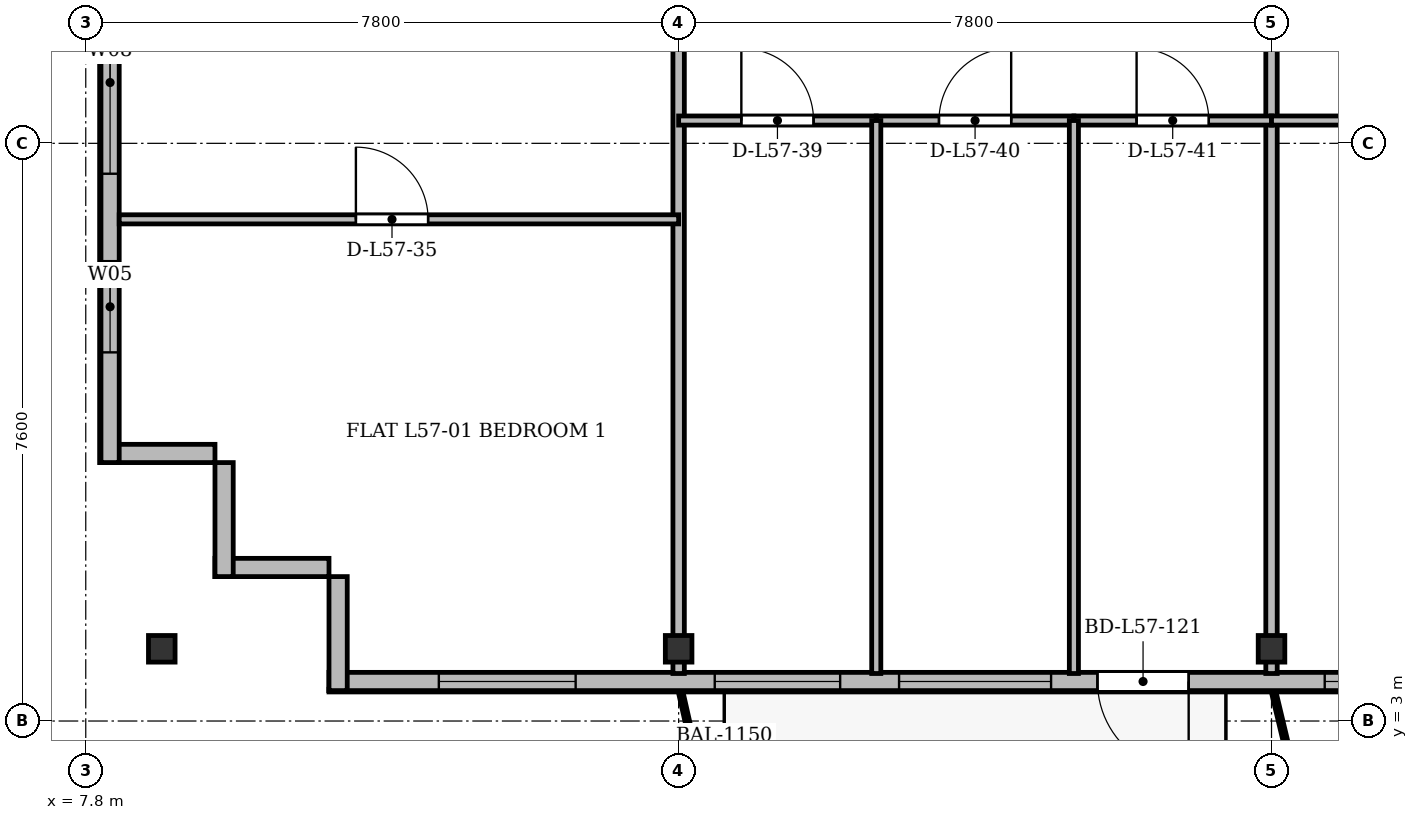
"""IFC4 building model, lengths in metres.
Left out: names, types, materials, properties, quantities, classifications, styles, units other than length and angle.
Written with IfcOpenShell. Run it as: python <this file> out.ifc"""

import sys

from ifc_helpers import new_model, si_unit, direction, frame, frame_2d, origin, origin_2d, place, context, subcontext, project, spatial, rectangle, i_section, extrude, source, transform, mapped, element, fill, save


model = new_model("IFC4")
c1 = context("Model", 3, precision=1e-05, world=origin(), true_north=direction((0.0, 1.0)))
c2 = subcontext(c1, "Body", "Model", "MODEL_VIEW")
j1 = project(units=[si_unit("LENGTHUNIT", "METRE"), si_unit("PLANEANGLEUNIT", "RADIAN")], contexts=[c1])
p1 = place(None, origin())
s1 = spatial("IfcSite", under=j1, at=p1, CompositionType="ELEMENT")
p2 = place(p1, origin())
s2 = spatial("IfcBuilding", under=s1, at=p2, CompositionType="ELEMENT")
p3 = place(p2, frame((0.0, 0.0, 219.3)))
s3 = spatial("IfcBuildingStorey", under=s2, at=p3, CompositionType="ELEMENT", Elevation=219.3)
m1 = source(origin(), c2, "Body", "SweptSolid", [
    extrude(i_section(OverallWidth=0.35, OverallDepth=0.35, WebThickness=0.018, FlangeThickness=0.028, at=origin_2d()), origin(), (0.0, 0.0, 1.0), 3.6),
])
for number, where, z_axis, x_axis in (
    (1, (8.8, 3.95, 0.0), (0.0, 0.0, 1.0), (1.0, 0.0, 0.0)),
    (2, (15.6, 3.95, 0.0), (0.0, 0.0, 1.0), (1.0, 0.0, 0.0)),
    (3, (23.4, 3.95, 0.0), (0.0, 0.0, 1.0), (1.0, 0.0, 0.0)),
):
    element("IfcColumn", number, at=place(p3, frame(where, z_axis=z_axis, x_axis=x_axis)), inside=s3, PredefinedType="COLUMN", context=c2, shape_type="MappedRepresentation", body=[
        mapped(m1, transform((0.0, 0.0, 0.0), x_axis=(1.0, 0.0, 0.0), y_axis=(0.0, 1.0, 0.0), z_axis=(0.0, 0.0, 1.0), scale=1.0)),
    ])
for number, where, z_axis, x_axis in (
    (4, (11.0, 5.02, 0.0), (0.0, 0.0, 1.0), (-1.0, 0.0, 0.0)),
    (5, (9.62, 4.9, 0.0), (0.0, 0.0, 1.0), (0.0, 1.0, 0.0)),
):
    element("IfcWall", number, at=place(p3, frame(where, z_axis=z_axis, x_axis=x_axis)), inside=s3, PredefinedType="SOLIDWALL", context=c2, shape_type="SweptSolid", body=[
        extrude(rectangle(XDim=1.5, YDim=0.24, at=frame_2d((0.75, 0.0))), origin(), (0.0, 0.0, 1.0), 3.36),
    ])
p4 = place(p3, frame((9.5, 6.52, 0.0), z_axis=(0.0, 0.0, 1.0), x_axis=(-1.0, 0.0, 0.0)))
e6 = element("IfcWall", 6, at=p4, inside=s3, PredefinedType="SOLIDWALL", context=c2, shape_type="SweptSolid", body=[
    extrude(rectangle(XDim=1.5, YDim=0.24, at=frame_2d((0.75, 0.0))), origin(), (0.0, 0.0, 1.0), 2.86),
])
p5 = place(p3, frame((8.12, 6.4, 0.0), z_axis=(0.0, 0.0, 1.0), x_axis=(0.0, 1.0, 0.0)))
e7 = element("IfcWall", 7, at=p5, inside=s3, PredefinedType="SOLIDWALL", context=c2, shape_type="SweptSolid", body=[
    extrude(rectangle(XDim=39.1, YDim=0.24, at=frame_2d((19.55, 0.0))), origin(), (0.0, 0.0, 1.0), 3.36),
])
p6 = place(p5, frame((1.45, 0.0, 0.92)))
e8 = element("IfcOpeningElement", 8, at=p6, cuts=e7, PredefinedType="OPENING", context=c2, shape_type="SweptSolid", body=[
    extrude(rectangle(XDim=1.2, YDim=1.65, at=frame_2d((0.6, 0.825))), frame((0.0, 0.13, 0.0), z_axis=(0.0, -1.0, 0.0), x_axis=(1.0, 0.0, 0.0)), (0.0, 0.0, 1.0), 0.26),
])
p7 = place(p5, frame((3.8, 0.0, 0.92)))
e9 = element("IfcOpeningElement", 9, at=p7, cuts=e7, PredefinedType="OPENING", context=c2, shape_type="SweptSolid", body=[
    extrude(rectangle(XDim=2.4, YDim=2.1, at=frame_2d((1.2, 1.05))), frame((0.0, 0.13, 0.0), z_axis=(0.0, -1.0, 0.0), x_axis=(1.0, 0.0, 0.0)), (0.0, 0.0, 1.0), 0.26),
])
p8 = place(p5, frame((8.0, 0.0, 0.92)))
e10 = element("IfcOpeningElement", 10, at=p8, cuts=e7, PredefinedType="OPENING", context=c2, shape_type="SweptSolid", body=[
    extrude(rectangle(XDim=2.4, YDim=2.1, at=frame_2d((1.2, 1.05))), frame((0.0, 0.13, 0.0), z_axis=(0.0, -1.0, 0.0), x_axis=(1.0, 0.0, 0.0)), (0.0, 0.0, 1.0), 0.26),
])
p9 = place(p5, frame((15.2, 0.0, 0.92)))
e11 = element("IfcOpeningElement", 11, at=p9, cuts=e7, PredefinedType="OPENING", context=c2, shape_type="SweptSolid", body=[
    extrude(rectangle(XDim=2.4, YDim=2.1, at=frame_2d((1.2, 1.05))), frame((0.0, 0.13, 0.0), z_axis=(0.0, -1.0, 0.0), x_axis=(1.0, 0.0, 0.0)), (0.0, 0.0, 1.0), 0.26),
])
p10 = place(p5, frame((33.4, 0.0, 0.92)))
e12 = element("IfcOpeningElement", 12, at=p10, cuts=e7, PredefinedType="OPENING", context=c2, shape_type="SweptSolid", body=[
    extrude(rectangle(XDim=1.2, YDim=1.65, at=frame_2d((0.6, 0.825))), frame((0.0, 0.13, 0.0), z_axis=(0.0, -1.0, 0.0), x_axis=(1.0, 0.0, 0.0)), (0.0, 0.0, 1.0), 0.26),
])
p11 = place(p5, frame((36.75, 0.0, 0.92)))
e13 = element("IfcOpeningElement", 13, at=p11, cuts=e7, PredefinedType="OPENING", context=c2, shape_type="SweptSolid", body=[
    extrude(rectangle(XDim=1.2, YDim=1.65, at=frame_2d((0.6, 0.825))), frame((0.0, 0.13, 0.0), z_axis=(0.0, -1.0, 0.0), x_axis=(1.0, 0.0, 0.0)), (0.0, 0.0, 1.0), 0.26),
])
p12 = place(p3, frame((63.4, 3.52, 0.0), z_axis=(0.0, 0.0, 1.0), x_axis=(-1.0, 0.0, 0.0)))
e14 = element("IfcWall", 14, at=p12, inside=s3, PredefinedType="SOLIDWALL", context=c2, shape_type="SweptSolid", body=[
    extrude(rectangle(XDim=52.4, YDim=0.24, at=frame_2d((26.2, 0.0))), origin(), (0.0, 0.0, 1.0), 3.36),
])
p13 = place(p12, frame((1.595, 0.0, 0.9)))
e15 = element("IfcOpeningElement", 15, at=p13, cuts=e14, PredefinedType="OPENING", context=c2, shape_type="SweptSolid", body=[
    extrude(rectangle(XDim=1.5, YDim=1.75, at=frame_2d((0.75, 0.875))), frame((0.0, 0.13, 0.0), z_axis=(0.0, -1.0, 0.0), x_axis=(1.0, 0.0, 0.0)), (0.0, 0.0, 1.0), 0.26),
])
p14 = place(p12, frame((7.5, 0.0, 0.9)))
e16 = element("IfcOpeningElement", 16, at=p14, cuts=e14, PredefinedType="OPENING", context=c2, shape_type="SweptSolid", body=[
    extrude(rectangle(XDim=2.0, YDim=1.95, at=frame_2d((1.0, 0.975))), frame((0.0, 0.13, 0.0), z_axis=(0.0, -1.0, 0.0), x_axis=(1.0, 0.0, 0.0)), (0.0, 0.0, 1.0), 0.26),
])
p15 = place(p12, frame((13.42, 0.0, 0.0)))
e17 = element("IfcOpeningElement", 17, at=p15, cuts=e14, PredefinedType="OPENING", context=c2, shape_type="SweptSolid", body=[
    extrude(rectangle(XDim=1.2, YDim=2.2, at=frame_2d((0.6, 1.1))), frame((0.0, 0.13, 0.0), z_axis=(0.0, -1.0, 0.0), x_axis=(1.0, 0.0, 0.0)), (0.0, 0.0, 1.0), 0.26),
])
p16 = place(p12, frame((15.1, 0.0, 0.9)))
e18 = element("IfcOpeningElement", 18, at=p16, cuts=e14, PredefinedType="OPENING", context=c2, shape_type="SweptSolid", body=[
    extrude(rectangle(XDim=1.8, YDim=1.8, at=frame_2d((0.9, 0.9))), frame((0.0, 0.13, 0.0), z_axis=(0.0, -1.0, 0.0), x_axis=(1.0, 0.0, 0.0)), (0.0, 0.0, 1.0), 0.26),
])
p17 = place(p12, frame((17.65, 0.0, 0.9)))
e19 = element("IfcOpeningElement", 19, at=p17, cuts=e14, PredefinedType="OPENING", context=c2, shape_type="SweptSolid", body=[
    extrude(rectangle(XDim=1.5, YDim=1.75, at=frame_2d((0.75, 0.875))), frame((0.0, 0.13, 0.0), z_axis=(0.0, -1.0, 0.0), x_axis=(1.0, 0.0, 0.0)), (0.0, 0.0, 1.0), 0.26),
])
p18 = place(p12, frame((20.5, 0.0, 0.9)))
e20 = element("IfcOpeningElement", 20, at=p18, cuts=e14, PredefinedType="OPENING", context=c2, shape_type="SweptSolid", body=[
    extrude(rectangle(XDim=1.5, YDim=1.75, at=frame_2d((0.75, 0.875))), frame((0.0, 0.13, 0.0), z_axis=(0.0, -1.0, 0.0), x_axis=(1.0, 0.0, 0.0)), (0.0, 0.0, 1.0), 0.26),
])
p19 = place(p12, frame((23.55, 0.0, 0.9)))
e21 = element("IfcOpeningElement", 21, at=p19, cuts=e14, PredefinedType="OPENING", context=c2, shape_type="SweptSolid", body=[
    extrude(rectangle(XDim=2.0, YDim=1.95, at=frame_2d((1.0, 0.975))), frame((0.0, 0.13, 0.0), z_axis=(0.0, -1.0, 0.0), x_axis=(1.0, 0.0, 0.0)), (0.0, 0.0, 1.0), 0.26),
])
p20 = place(p12, frame((28.675, 0.0, 0.9)))
e22 = element("IfcOpeningElement", 22, at=p20, cuts=e14, PredefinedType="OPENING", context=c2, shape_type="SweptSolid", body=[
    extrude(rectangle(XDim=1.65, YDim=1.85, at=frame_2d((0.825, 0.925))), frame((0.0, 0.13, 0.0), z_axis=(0.0, -1.0, 0.0), x_axis=(1.0, 0.0, 0.0)), (0.0, 0.0, 1.0), 0.26),
])
p21 = place(p12, frame((33.7, 0.0, 0.9)))
e23 = element("IfcOpeningElement", 23, at=p21, cuts=e14, PredefinedType="OPENING", context=c2, shape_type="SweptSolid", body=[
    extrude(rectangle(XDim=1.8, YDim=1.8, at=frame_2d((0.9, 0.9))), frame((0.0, 0.13, 0.0), z_axis=(0.0, -1.0, 0.0), x_axis=(1.0, 0.0, 0.0)), (0.0, 0.0, 1.0), 0.26),
])
p22 = place(p12, frame((37.1, 0.0, 0.9)))
e24 = element("IfcOpeningElement", 24, at=p22, cuts=e14, PredefinedType="OPENING", context=c2, shape_type="SweptSolid", body=[
    extrude(rectangle(XDim=2.2, YDim=1.8, at=frame_2d((1.1, 0.9))), frame((0.0, 0.13, 0.0), z_axis=(0.0, -1.0, 0.0), x_axis=(1.0, 0.0, 0.0)), (0.0, 0.0, 1.0), 0.26),
])
p23 = place(p12, frame((41.09, 0.0, 0.0)))
e25 = element("IfcOpeningElement", 25, at=p23, cuts=e14, PredefinedType="OPENING", context=c2, shape_type="SweptSolid", body=[
    extrude(rectangle(XDim=1.2, YDim=2.2, at=frame_2d((0.6, 1.1))), frame((0.0, 0.13, 0.0), z_axis=(0.0, -1.0, 0.0), x_axis=(1.0, 0.0, 0.0)), (0.0, 0.0, 1.0), 0.26),
])
p24 = place(p12, frame((42.9, 0.0, 0.9)))
e26 = element("IfcOpeningElement", 26, at=p24, cuts=e14, PredefinedType="OPENING", context=c2, shape_type="SweptSolid", body=[
    extrude(rectangle(XDim=2.0, YDim=1.95, at=frame_2d((1.0, 0.975))), frame((0.0, 0.13, 0.0), z_axis=(0.0, -1.0, 0.0), x_axis=(1.0, 0.0, 0.0)), (0.0, 0.0, 1.0), 0.26),
])
p25 = place(p12, frame((45.675, 0.0, 0.9)))
e27 = element("IfcOpeningElement", 27, at=p25, cuts=e14, PredefinedType="OPENING", context=c2, shape_type="SweptSolid", body=[
    extrude(rectangle(XDim=1.65, YDim=1.85, at=frame_2d((0.825, 0.925))), frame((0.0, 0.13, 0.0), z_axis=(0.0, -1.0, 0.0), x_axis=(1.0, 0.0, 0.0)), (0.0, 0.0, 1.0), 0.26),
])
p26 = place(p12, frame((49.155, 0.0, 0.9)))
e28 = element("IfcOpeningElement", 28, at=p26, cuts=e14, PredefinedType="OPENING", context=c2, shape_type="SweptSolid", body=[
    extrude(rectangle(XDim=1.8, YDim=1.8, at=frame_2d((0.9, 0.9))), frame((0.0, 0.13, 0.0), z_axis=(0.0, -1.0, 0.0), x_axis=(1.0, 0.0, 0.0)), (0.0, 0.0, 1.0), 0.26),
])
p27 = place(p3, frame((11.12, 3.4, 0.0), z_axis=(0.0, 0.0, 1.0), x_axis=(0.0, 1.0, 0.0)))
e29 = element("IfcWall", 29, at=p27, inside=s3, PredefinedType="SOLIDWALL", context=c2, shape_type="SweptSolid", body=[
    extrude(rectangle(XDim=1.5, YDim=0.24, at=frame_2d((0.75, 0.0))), origin(), (0.0, 0.0, 1.0), 2.91),
])
for number, where, z_axis, x_axis in (
    (30, (15.6, 3.625, 0.0), (0.0, 0.0, 1.0), (0.0, 1.0, 0.0)),
    (31, (23.4, 3.625, 0.0), (0.0, 0.0, 1.0), (0.0, 1.0, 0.0)),
):
    element("IfcWall", number, at=place(p3, frame(where, z_axis=z_axis, x_axis=x_axis)), inside=s3, PredefinedType="PARTITIONING", context=c2, shape_type="SweptSolid", body=[
        extrude(rectangle(XDim=27.375, YDim=0.15, at=frame_2d((13.688, 0.0))), origin(), (0.0, 0.0, 1.0), 2.86),
    ])
p28 = place(p3, frame((8.24, 9.6, 0.0), z_axis=(0.0, 0.0, 1.0), x_axis=(1.0, 0.0, 0.0)))
e32 = element("IfcWall", 32, at=p28, inside=s3, PredefinedType="PARTITIONING", context=c2, shape_type="SweptSolid", body=[
    extrude(rectangle(XDim=7.36, YDim=0.12, at=frame_2d((3.68, 0.0))), origin(), (0.0, 0.0, 1.0), 2.86),
])
p29 = place(p28, frame((3.114, 0.0, 0.0)))
e33 = element("IfcOpeningElement", 33, at=p29, cuts=e32, PredefinedType="OPENING", context=c2, shape_type="SweptSolid", body=[
    extrude(rectangle(XDim=0.95, YDim=2.15, at=frame_2d((0.475, 1.075))), frame((0.0, 0.07, 0.0), z_axis=(0.0, -1.0, 0.0), x_axis=(1.0, 0.0, 0.0)), (0.0, 0.0, 1.0), 0.14),
])
p30 = place(p3, frame((15.6, 10.9, 0.0), z_axis=(0.0, 0.0, 1.0), x_axis=(1.0, 0.0, 0.0)))
e34 = element("IfcWall", 34, at=p30, inside=s3, PredefinedType="PARTITIONING", context=c2, shape_type="SweptSolid", body=[
    extrude(rectangle(XDim=2.6, YDim=0.12, at=frame_2d((1.3, 0.0))), origin(), (0.0, 0.0, 1.0), 2.86),
])
p31 = place(p30, frame((0.825, 0.0, 0.0)))
e35 = element("IfcOpeningElement", 35, at=p31, cuts=e34, PredefinedType="OPENING", context=c2, shape_type="SweptSolid", body=[
    extrude(rectangle(XDim=0.95, YDim=2.15, at=frame_2d((0.475, 1.075))), frame((0.0, 0.07, 0.0), z_axis=(0.0, -1.0, 0.0), x_axis=(1.0, 0.0, 0.0)), (0.0, 0.0, 1.0), 0.14),
])
p32 = place(p3, frame((18.2, 10.9, 0.0), z_axis=(0.0, 0.0, 1.0), x_axis=(1.0, 0.0, 0.0)))
e36 = element("IfcWall", 36, at=p32, inside=s3, PredefinedType="PARTITIONING", context=c2, shape_type="SweptSolid", body=[
    extrude(rectangle(XDim=2.6, YDim=0.12, at=frame_2d((1.3, 0.0))), origin(), (0.0, 0.0, 1.0), 3.06),
])
p33 = place(p32, frame((0.825, 0.0, 0.0)))
e37 = element("IfcOpeningElement", 37, at=p33, cuts=e36, PredefinedType="OPENING", context=c2, shape_type="SweptSolid", body=[
    extrude(rectangle(XDim=0.95, YDim=2.15, at=frame_2d((0.475, 1.075))), frame((0.0, 0.07, 0.0), z_axis=(0.0, -1.0, 0.0), x_axis=(1.0, 0.0, 0.0)), (0.0, 0.0, 1.0), 0.14),
])
p34 = place(p3, frame((18.2, 3.625, 0.0), z_axis=(0.0, 0.0, 1.0), x_axis=(0.0, 1.0, 0.0)))
e38 = element("IfcWall", 38, at=p34, inside=s3, PredefinedType="PARTITIONING", context=c2, shape_type="SweptSolid", body=[
    extrude(rectangle(XDim=7.275, YDim=0.12, at=frame_2d((3.637, 0.0))), origin(), (0.0, 0.0, 1.0), 2.91),
])
p35 = place(p3, frame((20.8, 10.9, 0.0), z_axis=(0.0, 0.0, 1.0), x_axis=(1.0, 0.0, 0.0)))
e39 = element("IfcWall", 39, at=p35, inside=s3, PredefinedType="PARTITIONING", context=c2, shape_type="SweptSolid", body=[
    extrude(rectangle(XDim=2.6, YDim=0.12, at=frame_2d((1.3, 0.0))), origin(), (0.0, 0.0, 1.0), 2.86),
])
p36 = place(p35, frame((0.825, 0.0, 0.0)))
e40 = element("IfcOpeningElement", 40, at=p36, cuts=e39, PredefinedType="OPENING", context=c2, shape_type="SweptSolid", body=[
    extrude(rectangle(XDim=0.95, YDim=2.15, at=frame_2d((0.475, 1.075))), frame((0.0, 0.07, 0.0), z_axis=(0.0, -1.0, 0.0), x_axis=(1.0, 0.0, 0.0)), (0.0, 0.0, 1.0), 0.14),
])
p37 = place(p3, frame((20.8, 3.625, 0.0), z_axis=(0.0, 0.0, 1.0), x_axis=(0.0, 1.0, 0.0)))
e41 = element("IfcWall", 41, at=p37, inside=s3, PredefinedType="PARTITIONING", context=c2, shape_type="SweptSolid", body=[
    extrude(rectangle(XDim=7.275, YDim=0.12, at=frame_2d((3.637, 0.0))), origin(), (0.0, 0.0, 1.0), 2.91),
])
p38 = place(p3, frame((23.4, 10.9, 0.0), z_axis=(0.0, 0.0, 1.0), x_axis=(1.0, 0.0, 0.0)))
e42 = element("IfcWall", 42, at=p38, inside=s3, PredefinedType="PARTITIONING", context=c2, shape_type="SweptSolid", body=[
    extrude(rectangle(XDim=3.6, YDim=0.12, at=frame_2d((1.8, 0.0))), origin(), (0.0, 0.0, 1.0), 2.86),
])
p39 = place(p38, frame((1.325, 0.0, 0.0)))
e43 = element("IfcOpeningElement", 43, at=p39, cuts=e42, PredefinedType="OPENING", context=c2, shape_type="SweptSolid", body=[
    extrude(rectangle(XDim=0.95, YDim=2.15, at=frame_2d((0.475, 1.075))), frame((0.0, 0.07, 0.0), z_axis=(0.0, -1.0, 0.0), x_axis=(1.0, 0.0, 0.0)), (0.0, 0.0, 1.0), 0.14),
])
m2 = source(origin(), c2, "Body", "SweptSolid", [
    extrude(rectangle(XDim=1.2, YDim=1.65, at=frame_2d((0.6, 0.825))), frame((0.0, 0.03, 0.0), z_axis=(0.0, -1.0, 0.0), x_axis=(1.0, 0.0, 0.0)), (0.0, 0.0, 1.0), 0.06),
])
p40 = place(p6, origin())
e44 = element("IfcWindow", 44, at=p40, inside=s3, PartitioningType="SINGLE_PANEL", PredefinedType="WINDOW", context=c2, shape_type="MappedRepresentation", body=[
    mapped(m2, transform((0.0, 0.0, 0.0), x_axis=(1.0, 0.0, 0.0), y_axis=(0.0, 1.0, 0.0), z_axis=(0.0, 0.0, 1.0), scale=1.0)),
])
fill(e8, e44)
m3 = source(origin(), c2, "Body", "SweptSolid", [
    extrude(rectangle(XDim=2.4, YDim=2.1, at=frame_2d((1.2, 1.05))), frame((0.0, 0.03, 0.0), z_axis=(0.0, -1.0, 0.0), x_axis=(1.0, 0.0, 0.0)), (0.0, 0.0, 1.0), 0.06),
])
p41 = place(p7, origin())
e45 = element("IfcWindow", 45, at=p41, inside=s3, PartitioningType="SINGLE_PANEL", PredefinedType="WINDOW", context=c2, shape_type="MappedRepresentation", body=[
    mapped(m3, transform((0.0, 0.0, 0.0), x_axis=(1.0, 0.0, 0.0), y_axis=(0.0, 1.0, 0.0), z_axis=(0.0, 0.0, 1.0), scale=1.0)),
])
fill(e9, e45)
m4 = source(origin(), c2, "Body", "SweptSolid", [
    extrude(rectangle(XDim=2.2, YDim=1.8, at=frame_2d((1.1, 0.9))), frame((0.0, 0.03, 0.0), z_axis=(0.0, -1.0, 0.0), x_axis=(1.0, 0.0, 0.0)), (0.0, 0.0, 1.0), 0.06),
])
p42 = place(p22, origin())
e46 = element("IfcWindow", 46, at=p42, inside=s3, PartitioningType="SINGLE_PANEL", PredefinedType="WINDOW", context=c2, shape_type="MappedRepresentation", body=[
    mapped(m4, transform((0.0, 0.0, 0.0), x_axis=(1.0, 0.0, 0.0), y_axis=(0.0, 1.0, 0.0), z_axis=(0.0, 0.0, 1.0), scale=1.0)),
])
fill(e24, e46)
m5 = source(origin(), c2, "Body", "SweptSolid", [
    extrude(rectangle(XDim=1.2, YDim=2.2, at=frame_2d((0.6, 1.1))), frame((0.0, 0.025, 0.0), z_axis=(0.0, -1.0, 0.0), x_axis=(1.0, 0.0, 0.0)), (0.0, 0.0, 1.0), 0.05),
])
p43 = place(p23, origin())
e47 = element("IfcDoor", 47, at=p43, inside=s3, OperationType="SINGLE_SWING_LEFT", PredefinedType="DOOR", context=c2, shape_type="MappedRepresentation", body=[
    mapped(m5, transform((0.0, 0.0, 0.0), x_axis=(1.0, 0.0, 0.0), y_axis=(0.0, 1.0, 0.0), z_axis=(0.0, 0.0, 1.0), scale=1.0)),
])
fill(e25, e47)
m6 = source(origin(), c2, "Body", "SweptSolid", [
    extrude(rectangle(XDim=2.0, YDim=1.95, at=frame_2d((1.0, 0.975))), frame((0.0, 0.03, 0.0), z_axis=(0.0, -1.0, 0.0), x_axis=(1.0, 0.0, 0.0)), (0.0, 0.0, 1.0), 0.06),
])
p44 = place(p24, origin())
e48 = element("IfcWindow", 48, at=p44, inside=s3, PartitioningType="SINGLE_PANEL", PredefinedType="WINDOW", context=c2, shape_type="MappedRepresentation", body=[
    mapped(m6, transform((0.0, 0.0, 0.0), x_axis=(1.0, 0.0, 0.0), y_axis=(0.0, 1.0, 0.0), z_axis=(0.0, 0.0, 1.0), scale=1.0)),
])
fill(e26, e48)
m7 = source(origin(), c2, "Body", "SweptSolid", [
    extrude(rectangle(XDim=1.65, YDim=1.85, at=frame_2d((0.825, 0.925))), frame((0.0, 0.03, 0.0), z_axis=(0.0, -1.0, 0.0), x_axis=(1.0, 0.0, 0.0)), (0.0, 0.0, 1.0), 0.06),
])
p45 = place(p25, origin())
e49 = element("IfcWindow", 49, at=p45, inside=s3, PartitioningType="SINGLE_PANEL", PredefinedType="WINDOW", context=c2, shape_type="MappedRepresentation", body=[
    mapped(m7, transform((0.0, 0.0, 0.0), x_axis=(1.0, 0.0, 0.0), y_axis=(0.0, 1.0, 0.0), z_axis=(0.0, 0.0, 1.0), scale=1.0)),
])
fill(e27, e49)
m8 = source(origin(), c2, "Body", "SweptSolid", [
    extrude(rectangle(XDim=1.8, YDim=1.8, at=frame_2d((0.9, 0.9))), frame((0.0, 0.03, 0.0), z_axis=(0.0, -1.0, 0.0), x_axis=(1.0, 0.0, 0.0)), (0.0, 0.0, 1.0), 0.06),
])
p46 = place(p26, origin())
e50 = element("IfcWindow", 50, at=p46, inside=s3, PartitioningType="SINGLE_PANEL", PredefinedType="WINDOW", context=c2, shape_type="MappedRepresentation", body=[
    mapped(m8, transform((0.0, 0.0, 0.0), x_axis=(1.0, 0.0, 0.0), y_axis=(0.0, 1.0, 0.0), z_axis=(0.0, 0.0, 1.0), scale=1.0)),
])
fill(e28, e50)
m9 = source(origin(), c2, "Body", "SweptSolid", [
    extrude(rectangle(XDim=0.95, YDim=2.15, at=frame_2d((0.475, 1.075))), frame((0.0, 0.025, 0.0), z_axis=(0.0, -1.0, 0.0), x_axis=(1.0, 0.0, 0.0)), (0.0, 0.0, 1.0), 0.05),
])
p47 = place(p29, origin())
e51 = element("IfcDoor", 51, at=p47, inside=s3, OperationType="SINGLE_SWING_LEFT", PredefinedType="DOOR", context=c2, shape_type="MappedRepresentation", body=[
    mapped(m9, transform((0.0, 0.0, 0.0), x_axis=(1.0, 0.0, 0.0), y_axis=(0.0, 1.0, 0.0), z_axis=(0.0, 0.0, 1.0), scale=1.0)),
])
fill(e33, e51)
p48 = place(p31, origin())
e52 = element("IfcDoor", 52, at=p48, inside=s3, OperationType="SINGLE_SWING_LEFT", PredefinedType="DOOR", context=c2, shape_type="MappedRepresentation", body=[
    mapped(m9, transform((0.0, 0.0, 0.0), x_axis=(1.0, 0.0, 0.0), y_axis=(0.0, 1.0, 0.0), z_axis=(0.0, 0.0, 1.0), scale=1.0)),
])
fill(e35, e52)
p49 = place(p33, origin())
e53 = element("IfcDoor", 53, at=p49, inside=s3, OperationType="SINGLE_SWING_RIGHT", PredefinedType="DOOR", context=c2, shape_type="MappedRepresentation", body=[
    mapped(m9, transform((0.0, 0.0, 0.0), x_axis=(1.0, 0.0, 0.0), y_axis=(0.0, 1.0, 0.0), z_axis=(0.0, 0.0, 1.0), scale=1.0)),
])
fill(e37, e53)
p50 = place(p36, origin())
e54 = element("IfcDoor", 54, at=p50, inside=s3, OperationType="SINGLE_SWING_LEFT", PredefinedType="DOOR", context=c2, shape_type="MappedRepresentation", body=[
    mapped(m9, transform((0.0, 0.0, 0.0), x_axis=(1.0, 0.0, 0.0), y_axis=(0.0, 1.0, 0.0), z_axis=(0.0, 0.0, 1.0), scale=1.0)),
])
fill(e40, e54)
save(model, sys.argv[1])
